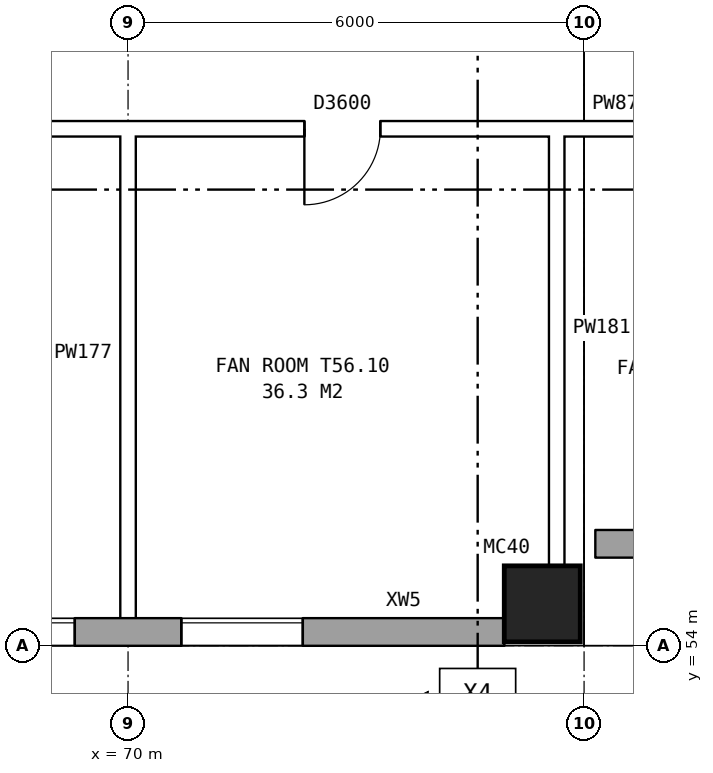
"""IFC4 building model, lengths in metres.
Left out: names, types, materials, properties, quantities, classifications, styles, units other than length and angle.
Written with IfcOpenShell. Run it as: python <this file> out.ifc"""

import sys

from ifc_helpers import new_model, si_unit, direction, frame, frame_2d, origin, origin_2d, place, context, subcontext, project, spatial, rectangle, hollow_rectangle, extrude, element, fill, save


model = new_model("IFC4")
c1 = context("Model", 3, precision=1e-05, world=origin(), true_north=direction((0.0, 1.0)))
c2 = subcontext(c1, "Body", "Model", "MODEL_VIEW")
j1 = project(units=[si_unit("LENGTHUNIT", "METRE"), si_unit("PLANEANGLEUNIT", "RADIAN")], contexts=[c1])
p1 = place(None, origin())
s1 = spatial("IfcSite", under=j1, at=p1, CompositionType="ELEMENT")
p2 = place(p1, origin())
s2 = spatial("IfcBuilding", under=s1, at=p2, CompositionType="ELEMENT")
p3 = place(p2, frame((0.0, 0.0, 198.6)))
s3 = spatial("IfcBuildingStorey", under=s2, at=p3, CompositionType="ELEMENT", Elevation=198.6)
p4 = place(p3, frame((75.45, 54.55, 0.0), z_axis=(0.0, 0.0, 1.0), x_axis=(1.0, 0.0, 0.0)))
e1 = element("IfcColumn", 1, at=p4, inside=s3, PredefinedType="COLUMN", context=c2, shape_type="SweptSolid", body=[
    extrude(hollow_rectangle(XDim=1.0, YDim=1.0, WallThickness=0.055, at=origin_2d()), origin(), (0.0, 0.0, 1.0), 4.2),
])
p5 = place(p3, frame((35.075, 54.18, 0.0), z_axis=(0.0, 0.0, 1.0), x_axis=(1.0, 0.0, 0.0)))
e2 = element("IfcWall", 2, at=p5, inside=s3, PredefinedType="STANDARD", context=c2, shape_type="SweptSolid", body=[
    extrude(rectangle(XDim=39.875, YDim=0.36, at=frame_2d((19.938, 0.0))), origin(), (0.0, 0.0, 1.0), 3.7),
])
p6 = place(p5, frame((2.625, 0.0, 1.5)))
e3 = element("IfcOpeningElement", 3, at=p6, cuts=e2, PredefinedType="OPENING", context=c2, shape_type="SweptSolid", body=[
    extrude(rectangle(XDim=1.6, YDim=1.2, at=frame_2d((0.8, 0.6))), frame((0.0, 0.19, 0.0), z_axis=(0.0, -1.0, 0.0), x_axis=(1.0, 0.0, 0.0)), (0.0, 0.0, 1.0), 0.38),
])
p7 = place(p5, frame((5.625, 0.0, 1.5)))
e4 = element("IfcOpeningElement", 4, at=p7, cuts=e2, PredefinedType="OPENING", context=c2, shape_type="SweptSolid", body=[
    extrude(rectangle(XDim=1.6, YDim=1.2, at=frame_2d((0.8, 0.6))), frame((0.0, 0.19, 0.0), z_axis=(0.0, -1.0, 0.0), x_axis=(1.0, 0.0, 0.0)), (0.0, 0.0, 1.0), 0.38),
])
p8 = place(p5, frame((8.625, 0.0, 1.5)))
e5 = element("IfcOpeningElement", 5, at=p8, cuts=e2, PredefinedType="OPENING", context=c2, shape_type="SweptSolid", body=[
    extrude(rectangle(XDim=1.6, YDim=1.2, at=frame_2d((0.8, 0.6))), frame((0.0, 0.19, 0.0), z_axis=(0.0, -1.0, 0.0), x_axis=(1.0, 0.0, 0.0)), (0.0, 0.0, 1.0), 0.38),
])
p9 = place(p5, frame((11.625, 0.0, 1.5)))
e6 = element("IfcOpeningElement", 6, at=p9, cuts=e2, PredefinedType="OPENING", context=c2, shape_type="SweptSolid", body=[
    extrude(rectangle(XDim=1.6, YDim=1.2, at=frame_2d((0.8, 0.6))), frame((0.0, 0.19, 0.0), z_axis=(0.0, -1.0, 0.0), x_axis=(1.0, 0.0, 0.0)), (0.0, 0.0, 1.0), 0.38),
])
p10 = place(p5, frame((14.625, 0.0, 1.5)))
e7 = element("IfcOpeningElement", 7, at=p10, cuts=e2, PredefinedType="OPENING", context=c2, shape_type="SweptSolid", body=[
    extrude(rectangle(XDim=1.6, YDim=1.2, at=frame_2d((0.8, 0.6))), frame((0.0, 0.19, 0.0), z_axis=(0.0, -1.0, 0.0), x_axis=(1.0, 0.0, 0.0)), (0.0, 0.0, 1.0), 0.38),
])
p11 = place(p5, frame((17.625, 0.0, 1.5)))
e8 = element("IfcOpeningElement", 8, at=p11, cuts=e2, PredefinedType="OPENING", context=c2, shape_type="SweptSolid", body=[
    extrude(rectangle(XDim=1.6, YDim=1.2, at=frame_2d((0.8, 0.6))), frame((0.0, 0.19, 0.0), z_axis=(0.0, -1.0, 0.0), x_axis=(1.0, 0.0, 0.0)), (0.0, 0.0, 1.0), 0.38),
])
p12 = place(p5, frame((20.625, 0.0, 1.5)))
e9 = element("IfcOpeningElement", 9, at=p12, cuts=e2, PredefinedType="OPENING", context=c2, shape_type="SweptSolid", body=[
    extrude(rectangle(XDim=1.6, YDim=1.2, at=frame_2d((0.8, 0.6))), frame((0.0, 0.19, 0.0), z_axis=(0.0, -1.0, 0.0), x_axis=(1.0, 0.0, 0.0)), (0.0, 0.0, 1.0), 0.38),
])
p13 = place(p5, frame((23.625, 0.0, 1.5)))
e10 = element("IfcOpeningElement", 10, at=p13, cuts=e2, PredefinedType="OPENING", context=c2, shape_type="SweptSolid", body=[
    extrude(rectangle(XDim=1.6, YDim=1.2, at=frame_2d((0.8, 0.6))), frame((0.0, 0.19, 0.0), z_axis=(0.0, -1.0, 0.0), x_axis=(1.0, 0.0, 0.0)), (0.0, 0.0, 1.0), 0.38),
])
p14 = place(p5, frame((26.625, 0.0, 1.5)))
e11 = element("IfcOpeningElement", 11, at=p14, cuts=e2, PredefinedType="OPENING", context=c2, shape_type="SweptSolid", body=[
    extrude(rectangle(XDim=1.6, YDim=1.2, at=frame_2d((0.8, 0.6))), frame((0.0, 0.19, 0.0), z_axis=(0.0, -1.0, 0.0), x_axis=(1.0, 0.0, 0.0)), (0.0, 0.0, 1.0), 0.38),
])
p15 = place(p5, frame((29.625, 0.0, 1.5)))
e12 = element("IfcOpeningElement", 12, at=p15, cuts=e2, PredefinedType="OPENING", context=c2, shape_type="SweptSolid", body=[
    extrude(rectangle(XDim=1.6, YDim=1.2, at=frame_2d((0.8, 0.6))), frame((0.0, 0.19, 0.0), z_axis=(0.0, -1.0, 0.0), x_axis=(1.0, 0.0, 0.0)), (0.0, 0.0, 1.0), 0.38),
])
p16 = place(p5, frame((32.625, 0.0, 1.5)))
e13 = element("IfcOpeningElement", 13, at=p16, cuts=e2, PredefinedType="OPENING", context=c2, shape_type="SweptSolid", body=[
    extrude(rectangle(XDim=1.6, YDim=1.2, at=frame_2d((0.8, 0.6))), frame((0.0, 0.19, 0.0), z_axis=(0.0, -1.0, 0.0), x_axis=(1.0, 0.0, 0.0)), (0.0, 0.0, 1.0), 0.38),
])
p17 = place(p5, frame((35.625, 0.0, 1.5)))
e14 = element("IfcOpeningElement", 14, at=p17, cuts=e2, PredefinedType="OPENING", context=c2, shape_type="SweptSolid", body=[
    extrude(rectangle(XDim=1.6, YDim=1.2, at=frame_2d((0.8, 0.6))), frame((0.0, 0.19, 0.0), z_axis=(0.0, -1.0, 0.0), x_axis=(1.0, 0.0, 0.0)), (0.0, 0.0, 1.0), 0.38),
])
p18 = place(p3, frame((76.15, 55.34, 0.0), z_axis=(0.0, 0.0, 1.0), x_axis=(1.0, 0.0, 0.0)))
e15 = element("IfcWall", 15, at=p18, inside=s3, PredefinedType="STANDARD", context=c2, shape_type="SweptSolid", body=[
    extrude(rectangle(XDim=54.7, YDim=0.36, at=frame_2d((27.35, 0.0))), origin(), (0.0, 0.0, 1.0), 3.7),
])
p19 = place(p18, frame((1.75, 0.0, 1.5)))
e16 = element("IfcOpeningElement", 16, at=p19, cuts=e15, PredefinedType="OPENING", context=c2, shape_type="SweptSolid", body=[
    extrude(rectangle(XDim=0.6, YDim=1.2, at=frame_2d((0.3, 0.6))), frame((0.0, 0.19, 0.0), z_axis=(0.0, -1.0, 0.0), x_axis=(1.0, 0.0, 0.0)), (0.0, 0.0, 1.0), 0.38),
])
p20 = place(p18, frame((4.206, 0.0, 1.5)))
e17 = element("IfcOpeningElement", 17, at=p20, cuts=e15, PredefinedType="OPENING", context=c2, shape_type="SweptSolid", body=[
    extrude(rectangle(XDim=1.6, YDim=1.2, at=frame_2d((0.8, 0.6))), frame((0.0, 0.19, 0.0), z_axis=(0.0, -1.0, 0.0), x_axis=(1.0, 0.0, 0.0)), (0.0, 0.0, 1.0), 0.38),
])
p21 = place(p18, frame((8.625, 0.0, 1.5)))
e18 = element("IfcOpeningElement", 18, at=p21, cuts=e15, PredefinedType="OPENING", context=c2, shape_type="SweptSolid", body=[
    extrude(rectangle(XDim=0.6, YDim=1.2, at=frame_2d((0.3, 0.6))), frame((0.0, 0.19, 0.0), z_axis=(0.0, -1.0, 0.0), x_axis=(1.0, 0.0, 0.0)), (0.0, 0.0, 1.0), 0.38),
])
p22 = place(p18, frame((11.081, 0.0, 1.5)))
e19 = element("IfcOpeningElement", 19, at=p22, cuts=e15, PredefinedType="OPENING", context=c2, shape_type="SweptSolid", body=[
    extrude(rectangle(XDim=1.6, YDim=1.2, at=frame_2d((0.8, 0.6))), frame((0.0, 0.19, 0.0), z_axis=(0.0, -1.0, 0.0), x_axis=(1.0, 0.0, 0.0)), (0.0, 0.0, 1.0), 0.38),
])
p23 = place(p18, frame((9.525, 0.0, 1.5)))
e20 = element("IfcOpeningElement", 20, at=p23, cuts=e15, PredefinedType="OPENING", context=c2, shape_type="SweptSolid", body=[
    extrude(rectangle(XDim=1.2, YDim=1.2, at=frame_2d((0.6, 0.6))), frame((0.0, 0.19, 0.0), z_axis=(0.0, -1.0, 0.0), x_axis=(1.0, 0.0, 0.0)), (0.0, 0.0, 1.0), 0.38),
])
p24 = place(p18, frame((17.956, 0.0, 1.5)))
e21 = element("IfcOpeningElement", 21, at=p24, cuts=e15, PredefinedType="OPENING", context=c2, shape_type="SweptSolid", body=[
    extrude(rectangle(XDim=1.6, YDim=1.2, at=frame_2d((0.8, 0.6))), frame((0.0, 0.19, 0.0), z_axis=(0.0, -1.0, 0.0), x_axis=(1.0, 0.0, 0.0)), (0.0, 0.0, 1.0), 0.38),
])
p25 = place(p18, frame((22.375, 0.0, 1.5)))
e22 = element("IfcOpeningElement", 22, at=p25, cuts=e15, PredefinedType="OPENING", context=c2, shape_type="SweptSolid", body=[
    extrude(rectangle(XDim=1.6, YDim=1.2, at=frame_2d((0.8, 0.6))), frame((0.0, 0.19, 0.0), z_axis=(0.0, -1.0, 0.0), x_axis=(1.0, 0.0, 0.0)), (0.0, 0.0, 1.0), 0.38),
])
p26 = place(p18, frame((24.831, 0.0, 1.5)))
e23 = element("IfcOpeningElement", 23, at=p26, cuts=e15, PredefinedType="OPENING", context=c2, shape_type="SweptSolid", body=[
    extrude(rectangle(XDim=1.6, YDim=1.2, at=frame_2d((0.8, 0.6))), frame((0.0, 0.19, 0.0), z_axis=(0.0, -1.0, 0.0), x_axis=(1.0, 0.0, 0.0)), (0.0, 0.0, 1.0), 0.38),
])
p27 = place(p18, frame((28.269, 0.0, 1.5)))
e24 = element("IfcOpeningElement", 24, at=p27, cuts=e15, PredefinedType="OPENING", context=c2, shape_type="SweptSolid", body=[
    extrude(rectangle(XDim=1.6, YDim=1.2, at=frame_2d((0.8, 0.6))), frame((0.0, 0.19, 0.0), z_axis=(0.0, -1.0, 0.0), x_axis=(1.0, 0.0, 0.0)), (0.0, 0.0, 1.0), 0.38),
])
p28 = place(p18, frame((26.775, 0.0, 1.5)))
e25 = element("IfcOpeningElement", 25, at=p28, cuts=e15, PredefinedType="OPENING", context=c2, shape_type="SweptSolid", body=[
    extrude(rectangle(XDim=0.9, YDim=1.2, at=frame_2d((0.45, 0.6))), frame((0.0, 0.19, 0.0), z_axis=(0.0, -1.0, 0.0), x_axis=(1.0, 0.0, 0.0)), (0.0, 0.0, 1.0), 0.38),
])
p29 = place(p18, frame((35.144, 0.0, 1.5)))
e26 = element("IfcOpeningElement", 26, at=p29, cuts=e15, PredefinedType="OPENING", context=c2, shape_type="SweptSolid", body=[
    extrude(rectangle(XDim=1.6, YDim=1.2, at=frame_2d((0.8, 0.6))), frame((0.0, 0.19, 0.0), z_axis=(0.0, -1.0, 0.0), x_axis=(1.0, 0.0, 0.0)), (0.0, 0.0, 1.0), 0.38),
])
p30 = place(p18, frame((37.075, 0.0, 1.5)))
e27 = element("IfcOpeningElement", 27, at=p30, cuts=e15, PredefinedType="OPENING", context=c2, shape_type="SweptSolid", body=[
    extrude(rectangle(XDim=0.6, YDim=1.2, at=frame_2d((0.3, 0.6))), frame((0.0, 0.19, 0.0), z_axis=(0.0, -1.0, 0.0), x_axis=(1.0, 0.0, 0.0)), (0.0, 0.0, 1.0), 0.38),
])
p31 = place(p18, frame((42.019, 0.0, 1.5)))
e28 = element("IfcOpeningElement", 28, at=p31, cuts=e15, PredefinedType="OPENING", context=c2, shape_type="SweptSolid", body=[
    extrude(rectangle(XDim=1.6, YDim=1.2, at=frame_2d((0.8, 0.6))), frame((0.0, 0.19, 0.0), z_axis=(0.0, -1.0, 0.0), x_axis=(1.0, 0.0, 0.0)), (0.0, 0.0, 1.0), 0.38),
])
p32 = place(p18, frame((37.975, 0.0, 1.5)))
e29 = element("IfcOpeningElement", 29, at=p32, cuts=e15, PredefinedType="OPENING", context=c2, shape_type="SweptSolid", body=[
    extrude(rectangle(XDim=1.2, YDim=1.2, at=frame_2d((0.6, 0.6))), frame((0.0, 0.19, 0.0), z_axis=(0.0, -1.0, 0.0), x_axis=(1.0, 0.0, 0.0)), (0.0, 0.0, 1.0), 0.38),
])
p33 = place(p18, frame((48.894, 0.0, 1.5)))
e30 = element("IfcOpeningElement", 30, at=p33, cuts=e15, PredefinedType="OPENING", context=c2, shape_type="SweptSolid", body=[
    extrude(rectangle(XDim=1.6, YDim=1.2, at=frame_2d((0.8, 0.6))), frame((0.0, 0.19, 0.0), z_axis=(0.0, -1.0, 0.0), x_axis=(1.0, 0.0, 0.0)), (0.0, 0.0, 1.0), 0.38),
])
p34 = place(p18, frame((50.825, 0.0, 1.5)))
e31 = element("IfcOpeningElement", 31, at=p34, cuts=e15, PredefinedType="OPENING", context=c2, shape_type="SweptSolid", body=[
    extrude(rectangle(XDim=0.6, YDim=1.2, at=frame_2d((0.3, 0.6))), frame((0.0, 0.19, 0.0), z_axis=(0.0, -1.0, 0.0), x_axis=(1.0, 0.0, 0.0)), (0.0, 0.0, 1.0), 0.38),
])
p35 = place(p18, frame((2.65, 0.0, 1.5)))
e32 = element("IfcOpeningElement", 32, at=p35, cuts=e15, PredefinedType="OPENING", context=c2, shape_type="SweptSolid", body=[
    extrude(rectangle(XDim=1.2, YDim=1.2, at=frame_2d((0.6, 0.6))), frame((0.0, 0.19, 0.0), z_axis=(0.0, -1.0, 0.0), x_axis=(1.0, 0.0, 0.0)), (0.0, 0.0, 1.0), 0.38),
])
p36 = place(p18, frame((13.025, 0.0, 1.5)))
e33 = element("IfcOpeningElement", 33, at=p36, cuts=e15, PredefinedType="OPENING", context=c2, shape_type="SweptSolid", body=[
    extrude(rectangle(XDim=0.6, YDim=1.2, at=frame_2d((0.3, 0.6))), frame((0.0, 0.19, 0.0), z_axis=(0.0, -1.0, 0.0), x_axis=(1.0, 0.0, 0.0)), (0.0, 0.0, 1.0), 0.38),
])
p37 = place(p18, frame((15.475, 0.0, 1.5)))
e34 = element("IfcOpeningElement", 34, at=p37, cuts=e15, PredefinedType="OPENING", context=c2, shape_type="SweptSolid", body=[
    extrude(rectangle(XDim=1.6, YDim=1.2, at=frame_2d((0.8, 0.6))), frame((0.0, 0.19, 0.0), z_axis=(0.0, -1.0, 0.0), x_axis=(1.0, 0.0, 0.0)), (0.0, 0.0, 1.0), 0.38),
])
p38 = place(p18, frame((30.175, 0.0, 1.5)))
e35 = element("IfcOpeningElement", 35, at=p38, cuts=e15, PredefinedType="OPENING", context=c2, shape_type="SweptSolid", body=[
    extrude(rectangle(XDim=1.6, YDim=1.2, at=frame_2d((0.8, 0.6))), frame((0.0, 0.19, 0.0), z_axis=(0.0, -1.0, 0.0), x_axis=(1.0, 0.0, 0.0)), (0.0, 0.0, 1.0), 0.38),
])
p39 = place(p18, frame((41.075, 0.0, 1.5)))
e36 = element("IfcOpeningElement", 36, at=p39, cuts=e15, PredefinedType="OPENING", context=c2, shape_type="SweptSolid", body=[
    extrude(rectangle(XDim=0.6, YDim=1.2, at=frame_2d((0.3, 0.6))), frame((0.0, 0.19, 0.0), z_axis=(0.0, -1.0, 0.0), x_axis=(1.0, 0.0, 0.0)), (0.0, 0.0, 1.0), 0.38),
])
p40 = place(p18, frame((43.925, 0.0, 1.5)))
e37 = element("IfcOpeningElement", 37, at=p40, cuts=e15, PredefinedType="OPENING", context=c2, shape_type="SweptSolid", body=[
    extrude(rectangle(XDim=1.6, YDim=1.2, at=frame_2d((0.8, 0.6))), frame((0.0, 0.19, 0.0), z_axis=(0.0, -1.0, 0.0), x_axis=(1.0, 0.0, 0.0)), (0.0, 0.0, 1.0), 0.38),
])
p41 = place(p18, frame((51.725, 0.0, 1.5)))
e38 = element("IfcOpeningElement", 38, at=p41, cuts=e15, PredefinedType="OPENING", context=c2, shape_type="SweptSolid", body=[
    extrude(rectangle(XDim=1.2, YDim=1.2, at=frame_2d((0.6, 0.6))), frame((0.0, 0.19, 0.0), z_axis=(0.0, -1.0, 0.0), x_axis=(1.0, 0.0, 0.0)), (0.0, 0.0, 1.0), 0.38),
])
p42 = place(p3, frame((32.24, 60.8, 0.0), z_axis=(0.0, 0.0, 1.0), x_axis=(1.0, 0.0, 0.0)))
e39 = element("IfcWall", 39, at=p42, inside=s3, PredefinedType="PARTITIONING", context=c2, shape_type="SweptSolid", body=[
    extrude(rectangle(XDim=136.52, YDim=0.2, at=frame_2d((68.26, 0.0))), origin(), (0.0, 0.0, 1.0), 3.7),
])
p43 = place(p42, frame((1.94, 0.0, 0.0)))
e40 = element("IfcOpeningElement", 40, at=p43, cuts=e39, PredefinedType="OPENING", context=c2, shape_type="SweptSolid", body=[
    extrude(rectangle(XDim=1.0, YDim=2.1, at=frame_2d((0.5, 1.05))), frame((0.0, 0.11, 0.0), z_axis=(0.0, -1.0, 0.0), x_axis=(1.0, 0.0, 0.0)), (0.0, 0.0, 1.0), 0.22),
])
p44 = place(p42, frame((8.76, 0.0, 0.0)))
e41 = element("IfcOpeningElement", 41, at=p44, cuts=e39, PredefinedType="OPENING", context=c2, shape_type="SweptSolid", body=[
    extrude(rectangle(XDim=1.0, YDim=2.1, at=frame_2d((0.5, 1.05))), frame((0.0, 0.11, 0.0), z_axis=(0.0, -1.0, 0.0), x_axis=(1.0, 0.0, 0.0)), (0.0, 0.0, 1.0), 0.22),
])
p45 = place(p42, frame((20.46, 0.0, 0.0)))
e42 = element("IfcOpeningElement", 42, at=p45, cuts=e39, PredefinedType="OPENING", context=c2, shape_type="SweptSolid", body=[
    extrude(rectangle(XDim=1.0, YDim=2.1, at=frame_2d((0.5, 1.05))), frame((0.0, 0.11, 0.0), z_axis=(0.0, -1.0, 0.0), x_axis=(1.0, 0.0, 0.0)), (0.0, 0.0, 1.0), 0.22),
])
p46 = place(p42, frame((30.06, 0.0, 0.0)))
e43 = element("IfcOpeningElement", 43, at=p46, cuts=e39, PredefinedType="OPENING", context=c2, shape_type="SweptSolid", body=[
    extrude(rectangle(XDim=1.0, YDim=2.1, at=frame_2d((0.5, 1.05))), frame((0.0, 0.11, 0.0), z_axis=(0.0, -1.0, 0.0), x_axis=(1.0, 0.0, 0.0)), (0.0, 0.0, 1.0), 0.22),
])
p47 = place(p42, frame((40.08, 0.0, 0.0)))
e44 = element("IfcOpeningElement", 44, at=p47, cuts=e39, PredefinedType="OPENING", context=c2, shape_type="SweptSolid", body=[
    extrude(rectangle(XDim=1.0, YDim=2.1, at=frame_2d((0.5, 1.05))), frame((0.0, 0.11, 0.0), z_axis=(0.0, -1.0, 0.0), x_axis=(1.0, 0.0, 0.0)), (0.0, 0.0, 1.0), 0.22),
])
p48 = place(p42, frame((46.517, 0.0, 0.0)))
e45 = element("IfcOpeningElement", 45, at=p48, cuts=e39, PredefinedType="OPENING", context=c2, shape_type="SweptSolid", body=[
    extrude(rectangle(XDim=1.0, YDim=2.1, at=frame_2d((0.5, 1.05))), frame((0.0, 0.11, 0.0), z_axis=(0.0, -1.0, 0.0), x_axis=(1.0, 0.0, 0.0)), (0.0, 0.0, 1.0), 0.22),
])
p49 = place(p42, frame((57.01, 0.0, 0.0)))
e46 = element("IfcOpeningElement", 46, at=p49, cuts=e39, PredefinedType="OPENING", context=c2, shape_type="SweptSolid", body=[
    extrude(rectangle(XDim=1.0, YDim=2.1, at=frame_2d((0.5, 1.05))), frame((0.0, 0.11, 0.0), z_axis=(0.0, -1.0, 0.0), x_axis=(1.0, 0.0, 0.0)), (0.0, 0.0, 1.0), 0.22),
])
p50 = place(p42, frame((70.76, 0.0, 0.0)))
e47 = element("IfcOpeningElement", 47, at=p50, cuts=e39, PredefinedType="OPENING", context=c2, shape_type="SweptSolid", body=[
    extrude(rectangle(XDim=1.0, YDim=2.1, at=frame_2d((0.5, 1.05))), frame((0.0, 0.11, 0.0), z_axis=(0.0, -1.0, 0.0), x_axis=(1.0, 0.0, 0.0)), (0.0, 0.0, 1.0), 0.22),
])
p51 = place(p42, frame((84.51, 0.0, 0.0)))
e48 = element("IfcOpeningElement", 48, at=p51, cuts=e39, PredefinedType="OPENING", context=c2, shape_type="SweptSolid", body=[
    extrude(rectangle(XDim=1.0, YDim=2.1, at=frame_2d((0.5, 1.05))), frame((0.0, 0.11, 0.0), z_axis=(0.0, -1.0, 0.0), x_axis=(1.0, 0.0, 0.0)), (0.0, 0.0, 1.0), 0.22),
])
p52 = place(p42, frame((95.003, 0.0, 0.0)))
e49 = element("IfcOpeningElement", 49, at=p52, cuts=e39, PredefinedType="OPENING", context=c2, shape_type="SweptSolid", body=[
    extrude(rectangle(XDim=1.0, YDim=2.1, at=frame_2d((0.5, 1.05))), frame((0.0, 0.11, 0.0), z_axis=(0.0, -1.0, 0.0), x_axis=(1.0, 0.0, 0.0)), (0.0, 0.0, 1.0), 0.22),
])
p53 = place(p42, frame((101.44, 0.0, 0.0)))
e50 = element("IfcOpeningElement", 50, at=p53, cuts=e39, PredefinedType="OPENING", context=c2, shape_type="SweptSolid", body=[
    extrude(rectangle(XDim=1.0, YDim=2.1, at=frame_2d((0.5, 1.05))), frame((0.0, 0.11, 0.0), z_axis=(0.0, -1.0, 0.0), x_axis=(1.0, 0.0, 0.0)), (0.0, 0.0, 1.0), 0.22),
])
p54 = place(p42, frame((111.56, 0.0, 0.0)))
e51 = element("IfcOpeningElement", 51, at=p54, cuts=e39, PredefinedType="OPENING", context=c2, shape_type="SweptSolid", body=[
    extrude(rectangle(XDim=1.0, YDim=2.1, at=frame_2d((0.5, 1.05))), frame((0.0, 0.11, 0.0), z_axis=(0.0, -1.0, 0.0), x_axis=(1.0, 0.0, 0.0)), (0.0, 0.0, 1.0), 0.22),
])
p55 = place(p42, frame((123.56, 0.0, 0.0)))
e52 = element("IfcOpeningElement", 52, at=p55, cuts=e39, PredefinedType="OPENING", context=c2, shape_type="SweptSolid", body=[
    extrude(rectangle(XDim=1.0, YDim=2.1, at=frame_2d((0.5, 1.05))), frame((0.0, 0.11, 0.0), z_axis=(0.0, -1.0, 0.0), x_axis=(1.0, 0.0, 0.0)), (0.0, 0.0, 1.0), 0.22),
])
p56 = place(p42, frame((132.08, 0.0, 0.0)))
e53 = element("IfcOpeningElement", 53, at=p56, cuts=e39, PredefinedType="OPENING", context=c2, shape_type="SweptSolid", body=[
    extrude(rectangle(XDim=1.0, YDim=2.1, at=frame_2d((0.5, 1.05))), frame((0.0, 0.11, 0.0), z_axis=(0.0, -1.0, 0.0), x_axis=(1.0, 0.0, 0.0)), (0.0, 0.0, 1.0), 0.22),
])
for number, where, z_axis, x_axis in (
    (54, (70.0, 54.24, 0.0), (0.0, 0.0, 1.0), (0.0, 1.0, 0.0)),
    (55, (75.64, 54.24, 0.0), (0.0, 0.0, 1.0), (0.0, 1.0, 0.0)),
):
    element("IfcWall", number, at=place(p3, frame(where, z_axis=z_axis, x_axis=x_axis)), inside=s3, PredefinedType="PARTITIONING", context=c2, shape_type="SweptSolid", body=[
        extrude(rectangle(XDim=6.66, YDim=0.2, at=frame_2d((3.33, 0.0))), origin(), (0.0, 0.0, 1.0), 3.7),
    ])
p57 = place(p16, origin())
e56 = element("IfcWindow", 56, at=p57, inside=s3, PartitioningType="DOUBLE_PANEL_HORIZONTAL", PredefinedType="WINDOW", context=c2, shape_type="SweptSolid", body=[
    extrude(rectangle(XDim=1.6, YDim=1.2, at=frame_2d((0.8, 0.6))), frame((0.0, 0.15, 0.0), z_axis=(0.0, -1.0, 0.0), x_axis=(1.0, 0.0, 0.0)), (0.0, 0.0, 1.0), 0.06),
])
fill(e13, e56)
p58 = place(p17, origin())
e57 = element("IfcWindow", 57, at=p58, inside=s3, PartitioningType="DOUBLE_PANEL_HORIZONTAL", PredefinedType="WINDOW", context=c2, shape_type="SweptSolid", body=[
    extrude(rectangle(XDim=1.6, YDim=1.2, at=frame_2d((0.8, 0.6))), frame((0.0, 0.15, 0.0), z_axis=(0.0, -1.0, 0.0), x_axis=(1.0, 0.0, 0.0)), (0.0, 0.0, 1.0), 0.06),
])
fill(e14, e57)
p59 = place(p47, frame((1.0, 0.0, 0.0), z_axis=(0.0, 0.0, 1.0), x_axis=(-1.0, 0.0, 0.0)))
e58 = element("IfcDoor", 58, at=p59, inside=s3, OperationType="SINGLE_SWING_RIGHT", PredefinedType="DOOR", context=c2, shape_type="SweptSolid", body=[
    extrude(rectangle(XDim=1.0, YDim=2.1, at=frame_2d((0.5, 1.05))), frame((0.0, 0.025, 0.0), z_axis=(0.0, -1.0, 0.0), x_axis=(1.0, 0.0, 0.0)), (0.0, 0.0, 1.0), 0.05),
])
fill(e44, e58)
save(model, sys.argv[1])
